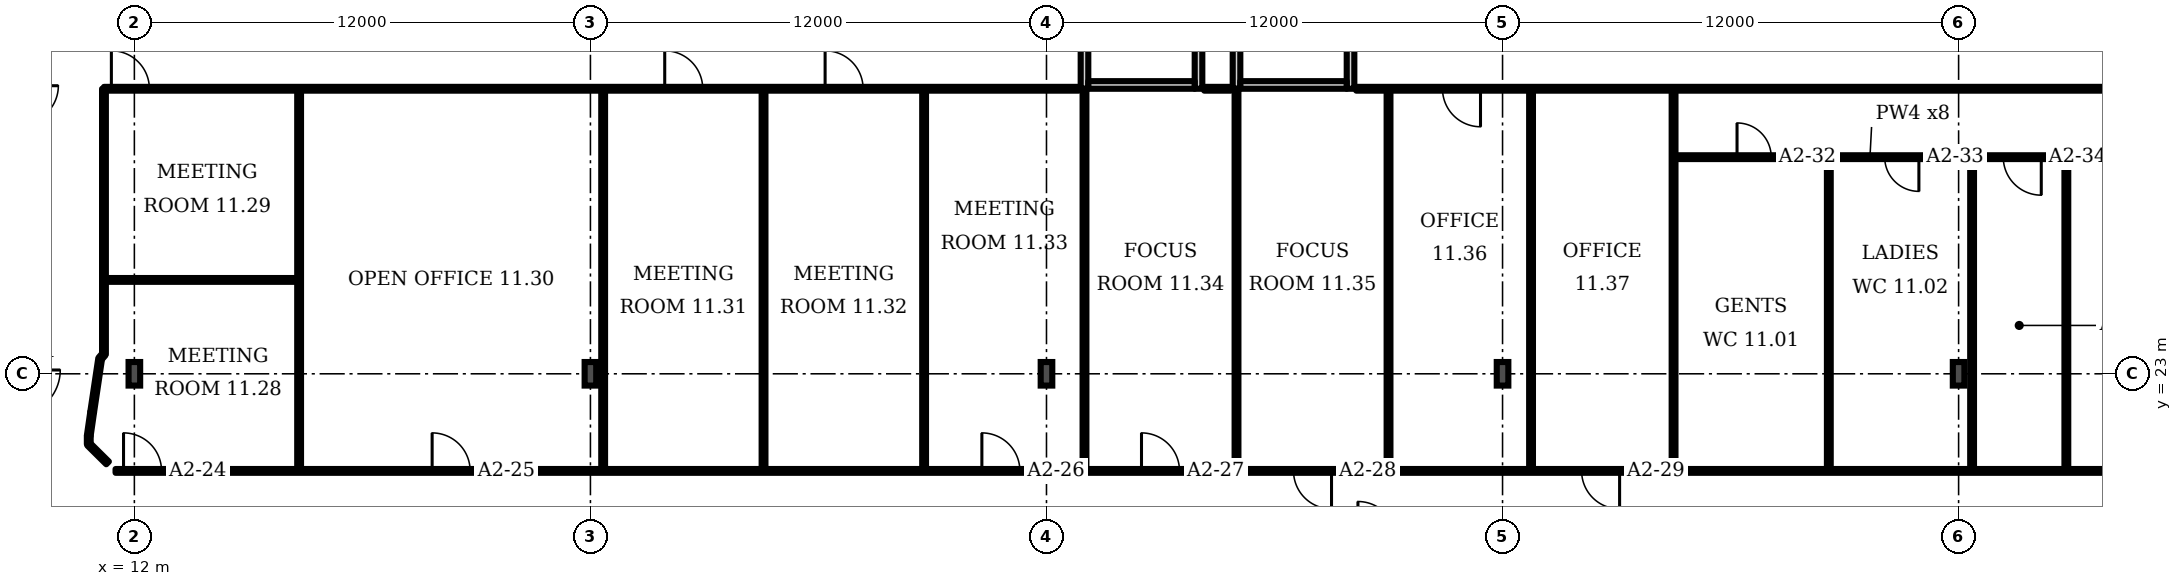
"""IFC4 building model, lengths in metres.
Left out: names, types, materials, properties, quantities, classifications, styles, units other than length and angle.
Written with IfcOpenShell. Run it as: python <this file> out.ifc"""

import sys

from ifc_helpers import new_model, si_unit, direction, frame, frame_2d, origin, origin_2d, place, context, subcontext, project, spatial, rectangle, i_section, extrude, element, fill, save


model = new_model("IFC4")
c1 = context("Model", 3, precision=1e-05, world=origin(), true_north=direction((0.0, 1.0)))
c2 = subcontext(c1, "Body", "Model", "MODEL_VIEW")
j1 = project(units=[si_unit("LENGTHUNIT", "METRE"), si_unit("PLANEANGLEUNIT", "RADIAN")], contexts=[c1])
p1 = place(None, origin())
s1 = spatial("IfcSite", under=j1, at=p1, CompositionType="ELEMENT")
p2 = place(p1, origin())
s2 = spatial("IfcBuilding", under=s1, at=p2, CompositionType="ELEMENT")
p3 = place(p2, frame((0.0, 0.0, 59.5)))
s3 = spatial("IfcBuildingStorey", under=s2, at=p3, CompositionType="ELEMENT", Elevation=59.5)
for number, where, z_axis, x_axis in (
    (1, (12.0, 23.0, 0.0), (0.0, 0.0, 1.0), (1.0, 0.0, 0.0)),
    (2, (24.0, 23.0, 0.0), (0.0, 0.0, 1.0), (1.0, 0.0, 0.0)),
    (3, (36.0, 23.0, 0.0), (0.0, 0.0, 1.0), (1.0, 0.0, 0.0)),
    (4, (48.0, 23.0, 0.0), (0.0, 0.0, 1.0), (1.0, 0.0, 0.0)),
    (5, (60.0, 23.0, 0.0), (0.0, 0.0, 1.0), (1.0, 0.0, 0.0)),
):
    element("IfcColumn", number, at=place(p3, frame(where, z_axis=z_axis, x_axis=x_axis)), inside=s3, PredefinedType="COLUMN", context=c2, shape_type="SweptSolid", body=[
        extrude(i_section(OverallWidth=0.305, OverallDepth=0.62, WebThickness=0.021, FlangeThickness=0.04, FilletRadius=0.027, at=origin_2d()), origin(), (0.0, 0.0, 1.0), 3.6),
    ])
p4 = place(p3, frame((37.0, 30.5, 0.0), z_axis=(0.0, 0.0, 1.0), x_axis=(0.0, 1.0, 0.0)))
e6 = element("IfcWall", 6, at=p4, inside=s3, PredefinedType="PARTITIONING", context=c2, shape_type="SweptSolid", body=[
    extrude(rectangle(XDim=3.5, YDim=0.2, at=frame_2d((1.75, 0.0))), origin(), (0.0, 0.0, 1.0), 3.2),
])
p5 = place(p4, frame((1.2, 0.0, 0.0)))
e7 = element("IfcOpeningElement", 7, at=p5, cuts=e6, PredefinedType="OPENING", context=c2, shape_type="SweptSolid", body=[
    extrude(rectangle(XDim=1.1, YDim=2.1, at=frame_2d((0.55, 1.05))), frame((0.0, 0.11, 0.0), z_axis=(0.0, -1.0, 0.0), x_axis=(1.0, 0.0, 0.0)), (0.0, 0.0, 1.0), 0.22),
])
p6 = place(p3, frame((40.0, 30.5, 0.0), z_axis=(0.0, 0.0, 1.0), x_axis=(0.0, 1.0, 0.0)))
e8 = element("IfcWall", 8, at=p6, inside=s3, PredefinedType="PARTITIONING", context=c2, shape_type="SweptSolid", body=[
    extrude(rectangle(XDim=3.5, YDim=0.2, at=frame_2d((1.75, 0.0))), origin(), (0.0, 0.0, 1.0), 3.2),
])
p7 = place(p3, frame((37.1, 30.6, 0.0), z_axis=(0.0, 0.0, 1.0), x_axis=(1.0, 0.0, 0.0)))
e9 = element("IfcWall", 9, at=p7, inside=s3, PredefinedType="PARTITIONING", context=c2, shape_type="SweptSolid", body=[
    extrude(rectangle(XDim=2.8, YDim=0.2, at=frame_2d((1.4, 0.0))), origin(), (0.0, 0.0, 1.0), 3.2),
])
p8 = place(p3, frame((41.0, 30.5, 0.0), z_axis=(0.0, 0.0, 1.0), x_axis=(0.0, 1.0, 0.0)))
e10 = element("IfcWall", 10, at=p8, inside=s3, PredefinedType="PARTITIONING", context=c2, shape_type="SweptSolid", body=[
    extrude(rectangle(XDim=3.5, YDim=0.2, at=frame_2d((1.75, 0.0))), origin(), (0.0, 0.0, 1.0), 3.2),
])
p9 = place(p3, frame((44.0, 30.5, 0.0), z_axis=(0.0, 0.0, 1.0), x_axis=(0.0, 1.0, 0.0)))
e11 = element("IfcWall", 11, at=p9, inside=s3, PredefinedType="PARTITIONING", context=c2, shape_type="SweptSolid", body=[
    extrude(rectangle(XDim=3.5, YDim=0.2, at=frame_2d((1.75, 0.0))), origin(), (0.0, 0.0, 1.0), 3.2),
])
p10 = place(p9, frame((1.2, 0.0, 0.0)))
e12 = element("IfcOpeningElement", 12, at=p10, cuts=e11, PredefinedType="OPENING", context=c2, shape_type="SweptSolid", body=[
    extrude(rectangle(XDim=1.1, YDim=2.1, at=frame_2d((0.55, 1.05))), frame((0.0, 0.11, 0.0), z_axis=(0.0, -1.0, 0.0), x_axis=(1.0, 0.0, 0.0)), (0.0, 0.0, 1.0), 0.22),
])
p11 = place(p3, frame((41.1, 30.6, 0.0), z_axis=(0.0, 0.0, 1.0), x_axis=(1.0, 0.0, 0.0)))
e13 = element("IfcWall", 13, at=p11, inside=s3, PredefinedType="PARTITIONING", context=c2, shape_type="SweptSolid", body=[
    extrude(rectangle(XDim=2.8, YDim=0.2, at=frame_2d((1.4, 0.0))), origin(), (0.0, 0.0, 1.0), 3.2),
])
p12 = place(p3, frame((10.8, 21.145, 0.0), z_axis=(0.0, 0.0, 1.0), x_axis=(0.0, 1.0, 0.0)))
e14 = element("IfcWall", 14, at=p12, inside=s3, PredefinedType="PARTITIONING", context=c2, shape_type="SweptSolid", body=[
    extrude(rectangle(XDim=0.225, YDim=0.1, at=frame_2d((0.113, 0.0))), origin(), (0.0, 0.0, 1.0), 3.2),
])
p13 = place(p3, frame((10.8, 21.37, 0.0), z_axis=(0.0, 0.0, 1.0), x_axis=(0.142287, 0.989823, 0.0)))
e15 = element("IfcWall", 15, at=p13, inside=s3, PredefinedType="PARTITIONING", context=c2, shape_type="SweptSolid", body=[
    extrude(rectangle(XDim=0.631, YDim=0.1, at=frame_2d((0.316, 0.0))), origin(), (0.0, 0.0, 1.0), 3.2),
])
p14 = place(p3, frame((10.89, 21.995, 0.0), z_axis=(0.0, 0.0, 1.0), x_axis=(0.147988, 0.988993, 0.0)))
e16 = element("IfcWall", 16, at=p14, inside=s3, PredefinedType="PARTITIONING", context=c2, shape_type="SweptSolid", body=[
    extrude(rectangle(XDim=1.42, YDim=0.1, at=frame_2d((0.71, 0.0))), origin(), (0.0, 0.0, 1.0), 3.2),
])
p15 = place(p3, frame((11.1, 23.4, 0.0), z_axis=(0.0, 0.0, 1.0), x_axis=(0.65566, 0.755051, 0.0)))
e17 = element("IfcWall", 17, at=p15, inside=s3, PredefinedType="PARTITIONING", context=c2, shape_type="SweptSolid", body=[
    extrude(rectangle(XDim=0.152, YDim=0.1, at=frame_2d((0.076, 0.0))), origin(), (0.0, 0.0, 1.0), 3.2),
])
p16 = place(p3, frame((11.2, 23.515, 0.0), z_axis=(0.0, 0.0, 1.0), x_axis=(0.0, 1.0, 0.0)))
e18 = element("IfcWall", 18, at=p16, inside=s3, PredefinedType="PARTITIONING", context=c2, shape_type="SweptSolid", body=[
    extrude(rectangle(XDim=6.985, YDim=0.1, at=frame_2d((3.493, 0.0))), origin(), (0.0, 0.0, 1.0), 3.2),
])
p17 = place(p3, frame((11.2, 25.47, 0.0), z_axis=(0.0, 0.0, 1.0), x_axis=(1.0, 0.0, 0.0)))
e19 = element("IfcWall", 19, at=p17, inside=s3, PredefinedType="PARTITIONING", context=c2, shape_type="SweptSolid", body=[
    extrude(rectangle(XDim=5.135, YDim=0.1, at=frame_2d((2.567, 0.0))), origin(), (0.0, 0.0, 1.0), 3.2),
])
p18 = place(p3, frame((11.2, 30.5, 0.0), z_axis=(0.0, 0.0, 1.0), x_axis=(1.0, 0.0, 0.0)))
e20 = element("IfcWall", 20, at=p18, inside=s3, PredefinedType="PARTITIONING", context=c2, shape_type="SweptSolid", body=[
    extrude(rectangle(XDim=25.65, YDim=0.1, at=frame_2d((12.825, 0.0))), origin(), (0.0, 0.0, 1.0), 3.2),
])
p19 = place(p18, frame((0.195, 0.0, 0.0)))
e21 = element("IfcOpeningElement", 21, at=p19, cuts=e20, PredefinedType="OPENING", context=c2, shape_type="SweptSolid", body=[
    extrude(rectangle(XDim=1.0, YDim=2.1, at=frame_2d((0.5, 1.05))), frame((0.0, 0.06, 0.0), z_axis=(0.0, -1.0, 0.0), x_axis=(1.0, 0.0, 0.0)), (0.0, 0.0, 1.0), 0.12),
])
p20 = place(p18, frame((14.755, 0.0, 0.0)))
e22 = element("IfcOpeningElement", 22, at=p20, cuts=e20, PredefinedType="OPENING", context=c2, shape_type="SweptSolid", body=[
    extrude(rectangle(XDim=1.0, YDim=2.1, at=frame_2d((0.5, 1.05))), frame((0.0, 0.06, 0.0), z_axis=(0.0, -1.0, 0.0), x_axis=(1.0, 0.0, 0.0)), (0.0, 0.0, 1.0), 0.12),
])
p21 = place(p18, frame((18.975, 0.0, 0.0)))
e23 = element("IfcOpeningElement", 23, at=p21, cuts=e20, PredefinedType="OPENING", context=c2, shape_type="SweptSolid", body=[
    extrude(rectangle(XDim=1.0, YDim=2.1, at=frame_2d((0.5, 1.05))), frame((0.0, 0.06, 0.0), z_axis=(0.0, -1.0, 0.0), x_axis=(1.0, 0.0, 0.0)), (0.0, 0.0, 1.0), 0.12),
])
p22 = place(p3, frame((11.295, 20.655, 0.0), z_axis=(0.0, 0.0, 1.0), x_axis=(-0.7106, 0.703589, 0.0)))
e24 = element("IfcWall", 24, at=p22, inside=s3, PredefinedType="PARTITIONING", context=c2, shape_type="SweptSolid", body=[
    extrude(rectangle(XDim=0.697, YDim=0.1, at=frame_2d((0.348, 0.0))), origin(), (0.0, 0.0, 1.0), 3.2),
])
p23 = place(p3, frame((11.505, 20.445, 0.0), z_axis=(0.0, 0.0, 1.0), x_axis=(1.0, 0.0, 0.0)))
e25 = element("IfcWall", 25, at=p23, inside=s3, PredefinedType="PARTITIONING", context=c2, shape_type="SweptSolid", body=[
    extrude(rectangle(XDim=58.82, YDim=0.1, at=frame_2d((29.41, 0.0))), origin(), (0.0, 0.0, 1.0), 3.2),
])
p24 = place(p23, frame((0.21, 0.0, 0.0)))
e26 = element("IfcOpeningElement", 26, at=p24, cuts=e25, PredefinedType="OPENING", context=c2, shape_type="SweptSolid", body=[
    extrude(rectangle(XDim=1.0, YDim=2.1, at=frame_2d((0.5, 1.05))), frame((0.0, 0.06, 0.0), z_axis=(0.0, -1.0, 0.0), x_axis=(1.0, 0.0, 0.0)), (0.0, 0.0, 1.0), 0.12),
])
p25 = place(p23, frame((8.33, 0.0, 0.0)))
e27 = element("IfcOpeningElement", 27, at=p25, cuts=e25, PredefinedType="OPENING", context=c2, shape_type="SweptSolid", body=[
    extrude(rectangle(XDim=1.0, YDim=2.1, at=frame_2d((0.5, 1.05))), frame((0.0, 0.06, 0.0), z_axis=(0.0, -1.0, 0.0), x_axis=(1.0, 0.0, 0.0)), (0.0, 0.0, 1.0), 0.12),
])
p26 = place(p23, frame((22.795, 0.0, 0.0)))
e28 = element("IfcOpeningElement", 28, at=p26, cuts=e25, PredefinedType="OPENING", context=c2, shape_type="SweptSolid", body=[
    extrude(rectangle(XDim=1.0, YDim=2.1, at=frame_2d((0.5, 1.05))), frame((0.0, 0.06, 0.0), z_axis=(0.0, -1.0, 0.0), x_axis=(1.0, 0.0, 0.0)), (0.0, 0.0, 1.0), 0.12),
])
p27 = place(p23, frame((26.995, 0.0, 0.0)))
e29 = element("IfcOpeningElement", 29, at=p27, cuts=e25, PredefinedType="OPENING", context=c2, shape_type="SweptSolid", body=[
    extrude(rectangle(XDim=1.0, YDim=2.1, at=frame_2d((0.5, 1.05))), frame((0.0, 0.06, 0.0), z_axis=(0.0, -1.0, 0.0), x_axis=(1.0, 0.0, 0.0)), (0.0, 0.0, 1.0), 0.12),
])
p28 = place(p23, frame((30.995, 0.0, 0.0)))
e30 = element("IfcOpeningElement", 30, at=p28, cuts=e25, PredefinedType="OPENING", context=c2, shape_type="SweptSolid", body=[
    extrude(rectangle(XDim=1.0, YDim=2.1, at=frame_2d((0.5, 1.05))), frame((0.0, 0.06, 0.0), z_axis=(0.0, -1.0, 0.0), x_axis=(1.0, 0.0, 0.0)), (0.0, 0.0, 1.0), 0.12),
])
p29 = place(p23, frame((38.575, 0.0, 0.0)))
e31 = element("IfcOpeningElement", 31, at=p29, cuts=e25, PredefinedType="OPENING", context=c2, shape_type="SweptSolid", body=[
    extrude(rectangle(XDim=1.0, YDim=2.1, at=frame_2d((0.5, 1.05))), frame((0.0, 0.06, 0.0), z_axis=(0.0, -1.0, 0.0), x_axis=(1.0, 0.0, 0.0)), (0.0, 0.0, 1.0), 0.12),
])
p30 = place(p23, frame((54.12, 0.0, 0.0)))
e32 = element("IfcOpeningElement", 32, at=p30, cuts=e25, PredefinedType="OPENING", context=c2, shape_type="SweptSolid", body=[
    extrude(rectangle(XDim=1.8, YDim=2.1, at=frame_2d((0.9, 1.05))), frame((0.0, 0.06, 0.0), z_axis=(0.0, -1.0, 0.0), x_axis=(1.0, 0.0, 0.0)), (0.0, 0.0, 1.0), 0.12),
])
for number, where, z_axis, x_axis in (
    (33, (16.335, 20.445, 0.0), (0.0, 0.0, 1.0), (0.0, 1.0, 0.0)),
    (34, (24.335, 20.445, 0.0), (0.0, 0.0, 1.0), (0.0, 1.0, 0.0)),
    (35, (28.555, 20.445, 0.0), (0.0, 0.0, 1.0), (0.0, 1.0, 0.0)),
    (36, (32.78, 20.445, 0.0), (0.0, 0.0, 1.0), (0.0, 1.0, 0.0)),
    (37, (37.0, 20.445, 0.0), (0.0, 0.0, 1.0), (0.0, 1.0, 0.0)),
    (38, (41.0, 20.445, 0.0), (0.0, 0.0, 1.0), (0.0, 1.0, 0.0)),
    (39, (45.0, 20.445, 0.0), (0.0, 0.0, 1.0), (0.0, 1.0, 0.0)),
    (40, (48.75, 20.445, 0.0), (0.0, 0.0, 1.0), (0.0, 1.0, 0.0)),
):
    element("IfcWall", number, at=place(p3, frame(where, z_axis=z_axis, x_axis=x_axis)), inside=s3, PredefinedType="PARTITIONING", context=c2, shape_type="SweptSolid", body=[
        extrude(rectangle(XDim=10.055, YDim=0.1, at=frame_2d((5.027, 0.0))), origin(), (0.0, 0.0, 1.0), 3.2),
    ])
p31 = place(p3, frame((52.5, 20.445, 0.0), z_axis=(0.0, 0.0, 1.0), x_axis=(0.0, 1.0, 0.0)))
e41 = element("IfcWall", 41, at=p31, inside=s3, PredefinedType="PARTITIONING", context=c2, shape_type="SweptSolid", body=[
    extrude(rectangle(XDim=10.045, YDim=0.1, at=frame_2d((5.022, 0.0))), origin(), (0.0, 0.0, 1.0), 3.2),
])
p32 = place(p3, frame((52.5, 28.7, 0.0), z_axis=(0.0, 0.0, 1.0), x_axis=(1.0, 0.0, 0.0)))
e42 = element("IfcWall", 42, at=p32, inside=s3, PredefinedType="PARTITIONING", context=c2, shape_type="SweptSolid", body=[
    extrude(rectangle(XDim=10.335, YDim=0.1, at=frame_2d((5.167, 0.0))), origin(), (0.0, 0.0, 1.0), 3.2),
])
p33 = place(p32, frame((1.67, 0.0, 0.0)))
e43 = element("IfcOpeningElement", 43, at=p33, cuts=e42, PredefinedType="OPENING", context=c2, shape_type="SweptSolid", body=[
    extrude(rectangle(XDim=0.9, YDim=2.1, at=frame_2d((0.45, 1.05))), frame((0.0, 0.06, 0.0), z_axis=(0.0, -1.0, 0.0), x_axis=(1.0, 0.0, 0.0)), (0.0, 0.0, 1.0), 0.12),
])
p34 = place(p32, frame((5.555, 0.0, 0.0)))
e44 = element("IfcOpeningElement", 44, at=p34, cuts=e42, PredefinedType="OPENING", context=c2, shape_type="SweptSolid", body=[
    extrude(rectangle(XDim=0.9, YDim=2.1, at=frame_2d((0.45, 1.05))), frame((0.0, 0.06, 0.0), z_axis=(0.0, -1.0, 0.0), x_axis=(1.0, 0.0, 0.0)), (0.0, 0.0, 1.0), 0.12),
])
p35 = place(p32, frame((8.675, 0.0, 0.0)))
e45 = element("IfcOpeningElement", 45, at=p35, cuts=e42, PredefinedType="OPENING", context=c2, shape_type="SweptSolid", body=[
    extrude(rectangle(XDim=1.0, YDim=2.1, at=frame_2d((0.5, 1.05))), frame((0.0, 0.06, 0.0), z_axis=(0.0, -1.0, 0.0), x_axis=(1.0, 0.0, 0.0)), (0.0, 0.0, 1.0), 0.12),
])
for number, where, z_axis, x_axis in (
    (46, (56.585, 20.445, 0.0), (0.0, 0.0, 1.0), (0.0, 1.0, 0.0)),
    (47, (60.355, 20.445, 0.0), (0.0, 0.0, 1.0), (0.0, 1.0, 0.0)),
    (48, (62.835, 20.445, 0.0), (0.0, 0.0, 1.0), (0.0, 1.0, 0.0)),
):
    element("IfcWall", number, at=place(p3, frame(where, z_axis=z_axis, x_axis=x_axis)), inside=s3, PredefinedType="PARTITIONING", context=c2, shape_type="SweptSolid", body=[
        extrude(rectangle(XDim=8.255, YDim=0.1, at=frame_2d((4.127, 0.0))), origin(), (0.0, 0.0, 1.0), 3.2),
    ])
p36 = place(p3, frame((40.15, 30.5, 0.0), z_axis=(0.0, 0.0, 1.0), x_axis=(1.0, 0.0, 0.0)))
e49 = element("IfcWall", 49, at=p36, inside=s3, PredefinedType="PARTITIONING", context=c2, shape_type="SweptSolid", body=[
    extrude(rectangle(XDim=0.7, YDim=0.1, at=frame_2d((0.35, 0.0))), origin(), (0.0, 0.0, 1.0), 3.2),
])
p37 = place(p3, frame((44.15, 30.5, 0.0), z_axis=(0.0, 0.0, 1.0), x_axis=(1.0, 0.0, 0.0)))
e50 = element("IfcWall", 50, at=p37, inside=s3, PredefinedType="PARTITIONING", context=c2, shape_type="SweptSolid", body=[
    extrude(rectangle(XDim=20.85, YDim=0.1, at=frame_2d((10.425, 0.0))), origin(), (0.0, 0.0, 1.0), 3.2),
])
p38 = place(p37, frame((2.27, 0.0, 0.0)))
e51 = element("IfcOpeningElement", 51, at=p38, cuts=e50, PredefinedType="OPENING", context=c2, shape_type="SweptSolid", body=[
    extrude(rectangle(XDim=1.0, YDim=2.1, at=frame_2d((0.5, 1.05))), frame((0.0, 0.06, 0.0), z_axis=(0.0, -1.0, 0.0), x_axis=(1.0, 0.0, 0.0)), (0.0, 0.0, 1.0), 0.12),
])
p39 = place(p24, origin())
e52 = element("IfcDoor", 52, at=p39, inside=s3, OperationType="SINGLE_SWING_LEFT", PredefinedType="DOOR", context=c2, shape_type="SweptSolid", body=[
    extrude(rectangle(XDim=1.0, YDim=2.1, at=frame_2d((0.5, 1.05))), frame((0.0, 0.025, 0.0), z_axis=(0.0, -1.0, 0.0), x_axis=(1.0, 0.0, 0.0)), (0.0, 0.0, 1.0), 0.05),
])
fill(e26, e52)
p40 = place(p25, origin())
e53 = element("IfcDoor", 53, at=p40, inside=s3, OperationType="SINGLE_SWING_LEFT", PredefinedType="DOOR", context=c2, shape_type="SweptSolid", body=[
    extrude(rectangle(XDim=1.0, YDim=2.1, at=frame_2d((0.5, 1.05))), frame((0.0, 0.025, 0.0), z_axis=(0.0, -1.0, 0.0), x_axis=(1.0, 0.0, 0.0)), (0.0, 0.0, 1.0), 0.05),
])
fill(e27, e53)
p41 = place(p26, origin())
e54 = element("IfcDoor", 54, at=p41, inside=s3, OperationType="SINGLE_SWING_LEFT", PredefinedType="DOOR", context=c2, shape_type="SweptSolid", body=[
    extrude(rectangle(XDim=1.0, YDim=2.1, at=frame_2d((0.5, 1.05))), frame((0.0, 0.025, 0.0), z_axis=(0.0, -1.0, 0.0), x_axis=(1.0, 0.0, 0.0)), (0.0, 0.0, 1.0), 0.05),
])
fill(e28, e54)
p42 = place(p27, origin())
e55 = element("IfcDoor", 55, at=p42, inside=s3, OperationType="SINGLE_SWING_LEFT", PredefinedType="DOOR", context=c2, shape_type="SweptSolid", body=[
    extrude(rectangle(XDim=1.0, YDim=2.1, at=frame_2d((0.5, 1.05))), frame((0.0, 0.025, 0.0), z_axis=(0.0, -1.0, 0.0), x_axis=(1.0, 0.0, 0.0)), (0.0, 0.0, 1.0), 0.05),
])
fill(e29, e55)
p43 = place(p28, origin())
e56 = element("IfcDoor", 56, at=p43, inside=s3, OperationType="SINGLE_SWING_RIGHT", PredefinedType="DOOR", context=c2, shape_type="SweptSolid", body=[
    extrude(rectangle(XDim=1.0, YDim=2.1, at=frame_2d((0.5, 1.05))), frame((0.0, 0.025, 0.0), z_axis=(0.0, -1.0, 0.0), x_axis=(1.0, 0.0, 0.0)), (0.0, 0.0, 1.0), 0.05),
])
fill(e30, e56)
p44 = place(p29, origin())
e57 = element("IfcDoor", 57, at=p44, inside=s3, OperationType="SINGLE_SWING_RIGHT", PredefinedType="DOOR", context=c2, shape_type="SweptSolid", body=[
    extrude(rectangle(XDim=1.0, YDim=2.1, at=frame_2d((0.5, 1.05))), frame((0.0, 0.025, 0.0), z_axis=(0.0, -1.0, 0.0), x_axis=(1.0, 0.0, 0.0)), (0.0, 0.0, 1.0), 0.05),
])
fill(e31, e57)
p45 = place(p33, origin())
e58 = element("IfcDoor", 58, at=p45, inside=s3, OperationType="SINGLE_SWING_LEFT", PredefinedType="DOOR", context=c2, shape_type="SweptSolid", body=[
    extrude(rectangle(XDim=0.9, YDim=2.1, at=frame_2d((0.45, 1.05))), frame((0.0, 0.025, 0.0), z_axis=(0.0, -1.0, 0.0), x_axis=(1.0, 0.0, 0.0)), (0.0, 0.0, 1.0), 0.05),
])
fill(e43, e58)
p46 = place(p34, origin())
e59 = element("IfcDoor", 59, at=p46, inside=s3, OperationType="SINGLE_SWING_RIGHT", PredefinedType="DOOR", context=c2, shape_type="SweptSolid", body=[
    extrude(rectangle(XDim=0.9, YDim=2.1, at=frame_2d((0.45, 1.05))), frame((0.0, 0.025, 0.0), z_axis=(0.0, -1.0, 0.0), x_axis=(1.0, 0.0, 0.0)), (0.0, 0.0, 1.0), 0.05),
])
fill(e44, e59)
p47 = place(p35, origin())
e60 = element("IfcDoor", 60, at=p47, inside=s3, OperationType="SINGLE_SWING_RIGHT", PredefinedType="DOOR", context=c2, shape_type="SweptSolid", body=[
    extrude(rectangle(XDim=1.0, YDim=2.1, at=frame_2d((0.5, 1.05))), frame((0.0, 0.025, 0.0), z_axis=(0.0, -1.0, 0.0), x_axis=(1.0, 0.0, 0.0)), (0.0, 0.0, 1.0), 0.05),
])
fill(e45, e60)
p48 = place(p19, origin())
e61 = element("IfcDoor", 61, at=p48, inside=s3, OperationType="SINGLE_SWING_LEFT", PredefinedType="DOOR", context=c2, shape_type="SweptSolid", body=[
    extrude(rectangle(XDim=1.0, YDim=2.1, at=frame_2d((0.5, 1.05))), frame((0.0, 0.025, 0.0), z_axis=(0.0, -1.0, 0.0), x_axis=(1.0, 0.0, 0.0)), (0.0, 0.0, 1.0), 0.05),
])
fill(e21, e61)
p49 = place(p20, origin())
e62 = element("IfcDoor", 62, at=p49, inside=s3, OperationType="SINGLE_SWING_LEFT", PredefinedType="DOOR", context=c2, shape_type="SweptSolid", body=[
    extrude(rectangle(XDim=1.0, YDim=2.1, at=frame_2d((0.5, 1.05))), frame((0.0, 0.025, 0.0), z_axis=(0.0, -1.0, 0.0), x_axis=(1.0, 0.0, 0.0)), (0.0, 0.0, 1.0), 0.05),
])
fill(e22, e62)
p50 = place(p21, origin())
e63 = element("IfcDoor", 63, at=p50, inside=s3, OperationType="SINGLE_SWING_LEFT", PredefinedType="DOOR", context=c2, shape_type="SweptSolid", body=[
    extrude(rectangle(XDim=1.0, YDim=2.1, at=frame_2d((0.5, 1.05))), frame((0.0, 0.025, 0.0), z_axis=(0.0, -1.0, 0.0), x_axis=(1.0, 0.0, 0.0)), (0.0, 0.0, 1.0), 0.05),
])
fill(e23, e63)
p51 = place(p38, origin())
e64 = element("IfcDoor", 64, at=p51, inside=s3, OperationType="SINGLE_SWING_RIGHT", PredefinedType="DOOR", context=c2, shape_type="SweptSolid", body=[
    extrude(rectangle(XDim=1.0, YDim=2.1, at=frame_2d((0.5, 1.05))), frame((0.0, 0.025, 0.0), z_axis=(0.0, -1.0, 0.0), x_axis=(1.0, 0.0, 0.0)), (0.0, 0.0, 1.0), 0.05),
])
fill(e51, e64)
save(model, sys.argv[1])
